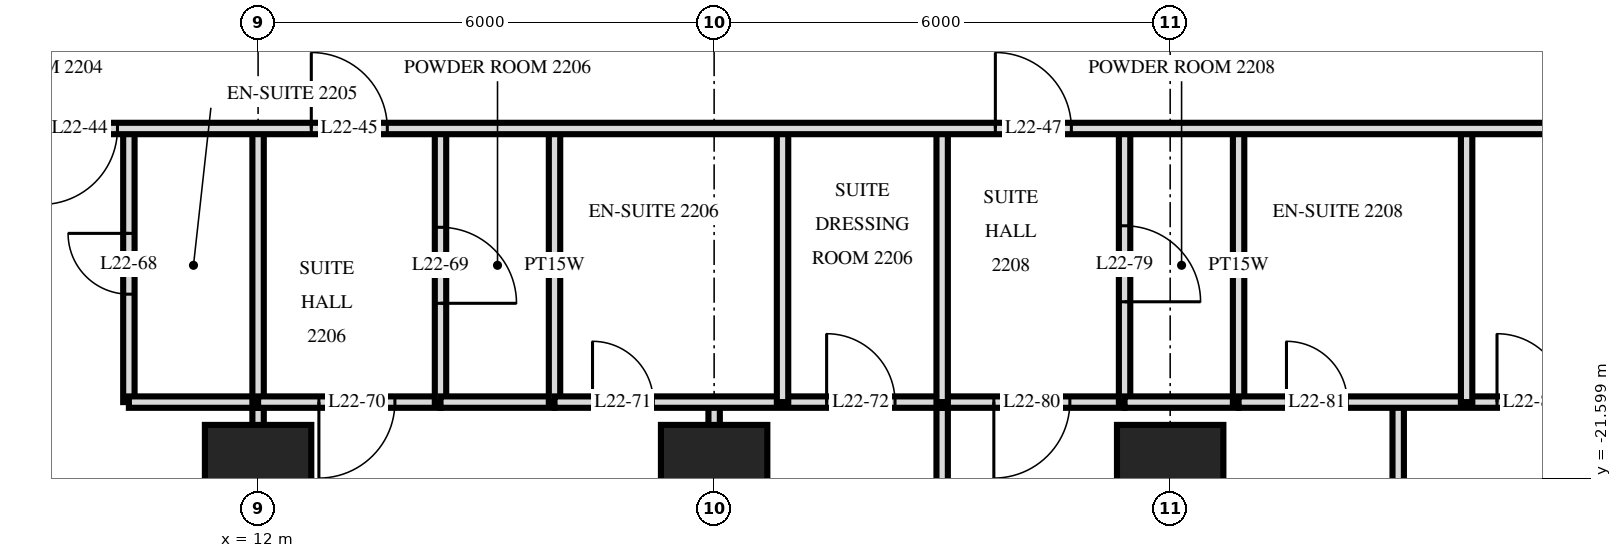
"""IFC4 building model, lengths in metres.
Left out: names, types, materials, properties, quantities, classifications, styles, units other than length and angle.
Written with IfcOpenShell. Run it as: python <this file> out.ifc"""

import sys

from ifc_helpers import new_model, si_unit, direction, frame, frame_2d, origin, origin_2d, place, context, subcontext, project, spatial, rectangle, extrude, element, fill, save


model = new_model("IFC4")
c1 = context("Model", 3, precision=1e-05, world=origin(), true_north=direction((0.0, 1.0)))
c2 = subcontext(c1, "Body", "Model", "MODEL_VIEW")
j1 = project(units=[si_unit("LENGTHUNIT", "METRE"), si_unit("PLANEANGLEUNIT", "RADIAN")], contexts=[c1])
p1 = place(None, origin())
s1 = spatial("IfcSite", under=j1, at=p1, CompositionType="ELEMENT")
p2 = place(p1, origin())
s2 = spatial("IfcBuilding", under=s1, at=p2, CompositionType="ELEMENT")
p3 = place(p2, frame((0.0, 0.0, 88.8)))
s3 = spatial("IfcBuildingStorey", under=s2, at=p3, CompositionType="ELEMENT", Elevation=88.8)
for number, where, z_axis, x_axis in (
    (1, (12.0, -21.6, 0.0), (0.0, 0.0, 1.0), (1.0, 0.0, 0.0)),
    (2, (18.0, -21.6, 0.0), (0.0, 0.0, 1.0), (1.0, 0.0, 0.0)),
    (3, (24.0, -21.6, 0.0), (0.0, 0.0, 1.0), (1.0, 0.0, 0.0)),
):
    element("IfcColumn", number, at=place(p3, frame(where, z_axis=z_axis, x_axis=x_axis)), inside=s3, PredefinedType="COLUMN", context=c2, shape_type="SweptSolid", body=[
        extrude(rectangle(XDim=1.4, YDim=1.4, at=origin_2d()), origin(), (0.0, 0.0, 1.0), 3.6),
    ])
p4 = place(p3, frame((27.9, -20.6, 0.0), z_axis=(0.0, 0.0, 1.0), x_axis=(0.0, 1.0, 0.0)))
e4 = element("IfcWall", 4, at=p4, inside=s3, PredefinedType="PARTITIONING", context=c2, shape_type="SweptSolid", body=[
    extrude(rectangle(XDim=3.6, YDim=0.15, at=frame_2d((1.8, 0.0))), origin(), (0.0, 0.0, 1.0), 3.32),
])
p5 = place(p3, frame((27.0, -29.22, 0.0), z_axis=(0.0, 0.0, 1.0), x_axis=(0.0, 1.0, 0.0)))
e5 = element("IfcWall", 5, at=p5, inside=s3, PredefinedType="PARTITIONING", context=c2, shape_type="SweptSolid", body=[
    extrude(rectangle(XDim=8.62, YDim=0.15, at=frame_2d((4.31, 0.0))), origin(), (0.0, 0.0, 1.0), 3.32),
])
p6 = place(p5, frame((3.77, 0.0, 0.0)))
e6 = element("IfcOpeningElement", 6, at=p6, cuts=e5, PredefinedType="OPENING", context=c2, shape_type="SweptSolid", body=[
    extrude(rectangle(XDim=0.9, YDim=2.1, at=frame_2d((0.45, 1.05))), frame((0.0, 0.085, 0.0), z_axis=(0.0, -1.0, 0.0), x_axis=(1.0, 0.0, 0.0)), (0.0, 0.0, 1.0), 0.17),
])
p7 = place(p3, frame((24.9, -20.6, 0.0), z_axis=(0.0, 0.0, 1.0), x_axis=(0.0, 1.0, 0.0)))
e7 = element("IfcWall", 7, at=p7, inside=s3, PredefinedType="PLUMBINGWALL", context=c2, shape_type="SweptSolid", body=[
    extrude(rectangle(XDim=3.6, YDim=0.15, at=frame_2d((1.8, 0.0))), origin(), (0.0, 0.0, 1.0), 3.32),
])
p8 = place(p3, frame((23.4, -20.6, 0.0), z_axis=(0.0, 0.0, 1.0), x_axis=(0.0, 1.0, 0.0)))
e8 = element("IfcWall", 8, at=p8, inside=s3, PredefinedType="PARTITIONING", context=c2, shape_type="SweptSolid", body=[
    extrude(rectangle(XDim=3.6, YDim=0.15, at=frame_2d((1.8, 0.0))), origin(), (0.0, 0.0, 1.0), 3.32),
])
p9 = place(p8, frame((1.32, 0.0, 0.0)))
e9 = element("IfcOpeningElement", 9, at=p9, cuts=e8, PredefinedType="OPENING", context=c2, shape_type="SweptSolid", body=[
    extrude(rectangle(XDim=1.0, YDim=2.1, at=frame_2d((0.5, 1.05))), frame((0.0, 0.085, 0.0), z_axis=(0.0, -1.0, 0.0), x_axis=(1.0, 0.0, 0.0)), (0.0, 0.0, 1.0), 0.17),
])
p10 = place(p3, frame((21.0, -20.6, 0.0), z_axis=(0.0, 0.0, 1.0), x_axis=(0.0, 1.0, 0.0)))
e10 = element("IfcWall", 10, at=p10, inside=s3, PredefinedType="PARTITIONING", context=c2, shape_type="SweptSolid", body=[
    extrude(rectangle(XDim=3.6, YDim=0.15, at=frame_2d((1.8, 0.0))), origin(), (0.0, 0.0, 1.0), 3.32),
])
p11 = place(p3, frame((21.0, -29.22, 0.0), z_axis=(0.0, 0.0, 1.0), x_axis=(0.0, 1.0, 0.0)))
e11 = element("IfcWall", 11, at=p11, inside=s3, PredefinedType="PARTITIONING", context=c2, shape_type="SweptSolid", body=[
    extrude(rectangle(XDim=8.62, YDim=0.15, at=frame_2d((4.31, 0.0))), origin(), (0.0, 0.0, 1.0), 3.32),
])
p12 = place(p3, frame((18.9, -20.6, 0.0), z_axis=(0.0, 0.0, 1.0), x_axis=(0.0, 1.0, 0.0)))
e12 = element("IfcWall", 12, at=p12, inside=s3, PredefinedType="PARTITIONING", context=c2, shape_type="SweptSolid", body=[
    extrude(rectangle(XDim=3.6, YDim=0.15, at=frame_2d((1.8, 0.0))), origin(), (0.0, 0.0, 1.0), 3.32),
])
p13 = place(p3, frame((18.0, -29.22, 0.0), z_axis=(0.0, 0.0, 1.0), x_axis=(0.0, 1.0, 0.0)))
e13 = element("IfcWall", 13, at=p13, inside=s3, PredefinedType="PARTITIONING", context=c2, shape_type="SweptSolid", body=[
    extrude(rectangle(XDim=8.62, YDim=0.15, at=frame_2d((4.31, 0.0))), origin(), (0.0, 0.0, 1.0), 3.32),
])
p14 = place(p13, frame((3.75, 0.0, 0.0)))
e14 = element("IfcOpeningElement", 14, at=p14, cuts=e13, PredefinedType="OPENING", context=c2, shape_type="SweptSolid", body=[
    extrude(rectangle(XDim=0.9, YDim=2.1, at=frame_2d((0.45, 1.05))), frame((0.0, 0.085, 0.0), z_axis=(0.0, -1.0, 0.0), x_axis=(1.0, 0.0, 0.0)), (0.0, 0.0, 1.0), 0.17),
])
p15 = place(p3, frame((15.9, -20.6, 0.0), z_axis=(0.0, 0.0, 1.0), x_axis=(0.0, 1.0, 0.0)))
e15 = element("IfcWall", 15, at=p15, inside=s3, PredefinedType="PLUMBINGWALL", context=c2, shape_type="SweptSolid", body=[
    extrude(rectangle(XDim=3.6, YDim=0.15, at=frame_2d((1.8, 0.0))), origin(), (0.0, 0.0, 1.0), 3.32),
])
p16 = place(p3, frame((14.4, -20.6, 0.0), z_axis=(0.0, 0.0, 1.0), x_axis=(0.0, 1.0, 0.0)))
e16 = element("IfcWall", 16, at=p16, inside=s3, PredefinedType="PARTITIONING", context=c2, shape_type="SweptSolid", body=[
    extrude(rectangle(XDim=3.6, YDim=0.15, at=frame_2d((1.8, 0.0))), origin(), (0.0, 0.0, 1.0), 3.32),
])
p17 = place(p16, frame((1.3, 0.0, 0.0)))
e17 = element("IfcOpeningElement", 17, at=p17, cuts=e16, PredefinedType="OPENING", context=c2, shape_type="SweptSolid", body=[
    extrude(rectangle(XDim=1.0, YDim=2.1, at=frame_2d((0.5, 1.05))), frame((0.0, 0.085, 0.0), z_axis=(0.0, -1.0, 0.0), x_axis=(1.0, 0.0, 0.0)), (0.0, 0.0, 1.0), 0.17),
])
p18 = place(p3, frame((12.0, -20.6, 0.0), z_axis=(0.0, 0.0, 1.0), x_axis=(0.0, 1.0, 0.0)))
e18 = element("IfcWall", 18, at=p18, inside=s3, PredefinedType="PARTITIONING", context=c2, shape_type="SweptSolid", body=[
    extrude(rectangle(XDim=3.6, YDim=0.15, at=frame_2d((1.8, 0.0))), origin(), (0.0, 0.0, 1.0), 3.32),
])
p19 = place(p3, frame((12.0, -29.22, 0.0), z_axis=(0.0, 0.0, 1.0), x_axis=(0.0, 1.0, 0.0)))
e19 = element("IfcWall", 19, at=p19, inside=s3, PredefinedType="PARTITIONING", context=c2, shape_type="SweptSolid", body=[
    extrude(rectangle(XDim=8.62, YDim=0.15, at=frame_2d((4.31, 0.0))), origin(), (0.0, 0.0, 1.0), 3.32),
])
p20 = place(p3, frame((10.3, -20.6, 0.0), z_axis=(0.0, 0.0, 1.0), x_axis=(0.0, 1.0, 0.0)))
e20 = element("IfcWall", 20, at=p20, inside=s3, PredefinedType="PARTITIONING", context=c2, shape_type="SweptSolid", body=[
    extrude(rectangle(XDim=3.6, YDim=0.15, at=frame_2d((1.8, 0.0))), origin(), (0.0, 0.0, 1.0), 3.32),
])
p21 = place(p20, frame((1.42, 0.0, 0.0)))
e21 = element("IfcOpeningElement", 21, at=p21, cuts=e20, PredefinedType="OPENING", context=c2, shape_type="SweptSolid", body=[
    extrude(rectangle(XDim=0.8, YDim=2.1, at=frame_2d((0.4, 1.05))), frame((0.0, 0.085, 0.0), z_axis=(0.0, -1.0, 0.0), x_axis=(1.0, 0.0, 0.0)), (0.0, 0.0, 1.0), 0.17),
])
p22 = place(p3, frame((12.0, -20.6, 0.0), z_axis=(0.0, 0.0, 1.0), x_axis=(1.0, 0.0, 0.0)))
e22 = element("IfcWall", 22, at=p22, inside=s3, PredefinedType="PARTITIONING", context=c2, shape_type="SweptSolid", body=[
    extrude(rectangle(XDim=2.4, YDim=0.15, at=frame_2d((1.2, 0.0))), origin(), (0.0, 0.0, 1.0), 3.32),
])
p23 = place(p22, frame((0.8, 0.0, 0.0)))
e23 = element("IfcOpeningElement", 23, at=p23, cuts=e22, PredefinedType="OPENING", context=c2, shape_type="SweptSolid", body=[
    extrude(rectangle(XDim=1.0, YDim=2.1, at=frame_2d((0.5, 1.05))), frame((0.0, 0.085, 0.0), z_axis=(0.0, -1.0, 0.0), x_axis=(1.0, 0.0, 0.0)), (0.0, 0.0, 1.0), 0.17),
])
p24 = place(p3, frame((21.0, -20.6, 0.0), z_axis=(0.0, 0.0, 1.0), x_axis=(1.0, 0.0, 0.0)))
e24 = element("IfcWall", 24, at=p24, inside=s3, PredefinedType="PARTITIONING", context=c2, shape_type="SweptSolid", body=[
    extrude(rectangle(XDim=2.4, YDim=0.15, at=frame_2d((1.2, 0.0))), origin(), (0.0, 0.0, 1.0), 3.32),
])
p25 = place(p24, frame((0.68, 0.0, 0.0)))
e25 = element("IfcOpeningElement", 25, at=p25, cuts=e24, PredefinedType="OPENING", context=c2, shape_type="SweptSolid", body=[
    extrude(rectangle(XDim=1.0, YDim=2.1, at=frame_2d((0.5, 1.05))), frame((0.0, 0.085, 0.0), z_axis=(0.0, -1.0, 0.0), x_axis=(1.0, 0.0, 0.0)), (0.0, 0.0, 1.0), 0.17),
])
p26 = place(p3, frame((10.3, -20.6, 0.0), z_axis=(0.0, 0.0, 1.0), x_axis=(1.0, 0.0, 0.0)))
e26 = element("IfcWall", 26, at=p26, inside=s3, PredefinedType="PARTITIONING", context=c2, shape_type="SweptSolid", body=[
    extrude(rectangle(XDim=1.7, YDim=0.15, at=frame_2d((0.85, 0.0))), origin(), (0.0, 0.0, 1.0), 3.32),
])
p27 = place(p3, frame((15.9, -20.6, 0.0), z_axis=(0.0, 0.0, 1.0), x_axis=(1.0, 0.0, 0.0)))
e27 = element("IfcWall", 27, at=p27, inside=s3, PredefinedType="PARTITIONING", context=c2, shape_type="SweptSolid", body=[
    extrude(rectangle(XDim=5.1, YDim=0.15, at=frame_2d((2.55, 0.0))), origin(), (0.0, 0.0, 1.0), 3.32),
])
p28 = place(p27, frame((0.5, 0.0, 0.0)))
e28 = element("IfcOpeningElement", 28, at=p28, cuts=e27, PredefinedType="OPENING", context=c2, shape_type="SweptSolid", body=[
    extrude(rectangle(XDim=0.8, YDim=2.1, at=frame_2d((0.4, 1.05))), frame((0.0, 0.085, 0.0), z_axis=(0.0, -1.0, 0.0), x_axis=(1.0, 0.0, 0.0)), (0.0, 0.0, 1.0), 0.17),
])
p29 = place(p27, frame((3.58, 0.0, 0.0)))
e29 = element("IfcOpeningElement", 29, at=p29, cuts=e27, PredefinedType="OPENING", context=c2, shape_type="SweptSolid", body=[
    extrude(rectangle(XDim=0.9, YDim=2.1, at=frame_2d((0.45, 1.05))), frame((0.0, 0.085, 0.0), z_axis=(0.0, -1.0, 0.0), x_axis=(1.0, 0.0, 0.0)), (0.0, 0.0, 1.0), 0.17),
])
p30 = place(p3, frame((24.9, -20.6, 0.0), z_axis=(0.0, 0.0, 1.0), x_axis=(1.0, 0.0, 0.0)))
e30 = element("IfcWall", 30, at=p30, inside=s3, PredefinedType="PARTITIONING", context=c2, shape_type="SweptSolid", body=[
    extrude(rectangle(XDim=8.22, YDim=0.15, at=frame_2d((4.11, 0.0))), origin(), (0.0, 0.0, 1.0), 3.32),
])
p31 = place(p30, frame((0.63, 0.0, 0.0)))
e31 = element("IfcOpeningElement", 31, at=p31, cuts=e30, PredefinedType="OPENING", context=c2, shape_type="SweptSolid", body=[
    extrude(rectangle(XDim=0.8, YDim=2.1, at=frame_2d((0.4, 1.05))), frame((0.0, 0.085, 0.0), z_axis=(0.0, -1.0, 0.0), x_axis=(1.0, 0.0, 0.0)), (0.0, 0.0, 1.0), 0.17),
])
p32 = place(p30, frame((3.4, 0.0, 0.0)))
e32 = element("IfcOpeningElement", 32, at=p32, cuts=e30, PredefinedType="OPENING", context=c2, shape_type="SweptSolid", body=[
    extrude(rectangle(XDim=0.9, YDim=2.1, at=frame_2d((0.45, 1.05))), frame((0.0, 0.085, 0.0), z_axis=(0.0, -1.0, 0.0), x_axis=(1.0, 0.0, 0.0)), (0.0, 0.0, 1.0), 0.17),
])
for number, where, z_axis, x_axis in (
    (33, (14.4, -20.6, 0.0), (0.0, 0.0, 1.0), (1.0, 0.0, 0.0)),
    (34, (23.4, -20.6, 0.0), (0.0, 0.0, 1.0), (1.0, 0.0, 0.0)),
):
    element("IfcWall", number, at=place(p3, frame(where, z_axis=z_axis, x_axis=x_axis)), inside=s3, PredefinedType="PLUMBINGWALL", context=c2, shape_type="SweptSolid", body=[
        extrude(rectangle(XDim=1.5, YDim=0.15, at=frame_2d((0.75, 0.0))), origin(), (0.0, 0.0, 1.0), 3.32),
    ])
p33 = place(p3, frame((-33.12, -17.0, 0.0), z_axis=(0.0, 0.0, 1.0), x_axis=(1.0, 0.0, 0.0)))
e35 = element("IfcWall", 35, at=p33, inside=s3, PredefinedType="PARTITIONING", context=c2, shape_type="SweptSolid", body=[
    extrude(rectangle(XDim=66.24, YDim=0.15, at=frame_2d((33.12, 0.0))), origin(), (0.0, 0.0, 1.0), 3.32),
])
p34 = place(p33, frame((16.27, 0.0, 0.0)))
e36 = element("IfcOpeningElement", 36, at=p34, cuts=e35, PredefinedType="OPENING", context=c2, shape_type="SweptSolid", body=[
    extrude(rectangle(XDim=1.0, YDim=2.1, at=frame_2d((0.5, 1.05))), frame((0.0, 0.085, 0.0), z_axis=(0.0, -1.0, 0.0), x_axis=(1.0, 0.0, 0.0)), (0.0, 0.0, 1.0), 0.17),
])
p35 = place(p33, frame((22.97, 0.0, 0.0)))
e37 = element("IfcOpeningElement", 37, at=p35, cuts=e35, PredefinedType="OPENING", context=c2, shape_type="SweptSolid", body=[
    extrude(rectangle(XDim=1.0, YDim=2.1, at=frame_2d((0.5, 1.05))), frame((0.0, 0.085, 0.0), z_axis=(0.0, -1.0, 0.0), x_axis=(1.0, 0.0, 0.0)), (0.0, 0.0, 1.0), 0.17),
])
p36 = place(p33, frame((34.42, 0.0, 0.0)))
e38 = element("IfcOpeningElement", 38, at=p36, cuts=e35, PredefinedType="OPENING", context=c2, shape_type="SweptSolid", body=[
    extrude(rectangle(XDim=1.0, YDim=2.1, at=frame_2d((0.5, 1.05))), frame((0.0, 0.085, 0.0), z_axis=(0.0, -1.0, 0.0), x_axis=(1.0, 0.0, 0.0)), (0.0, 0.0, 1.0), 0.17),
])
p37 = place(p33, frame((39.22, 0.0, 0.0)))
e39 = element("IfcOpeningElement", 39, at=p37, cuts=e35, PredefinedType="OPENING", context=c2, shape_type="SweptSolid", body=[
    extrude(rectangle(XDim=1.0, YDim=2.1, at=frame_2d((0.5, 1.05))), frame((0.0, 0.085, 0.0), z_axis=(0.0, -1.0, 0.0), x_axis=(1.0, 0.0, 0.0)), (0.0, 0.0, 1.0), 0.17),
])
p38 = place(p33, frame((42.27, 0.0, 0.0)))
e40 = element("IfcOpeningElement", 40, at=p38, cuts=e35, PredefinedType="OPENING", context=c2, shape_type="SweptSolid", body=[
    extrude(rectangle(XDim=1.0, YDim=2.1, at=frame_2d((0.5, 1.05))), frame((0.0, 0.085, 0.0), z_axis=(0.0, -1.0, 0.0), x_axis=(1.0, 0.0, 0.0)), (0.0, 0.0, 1.0), 0.17),
])
p39 = place(p33, frame((45.82, 0.0, 0.0)))
e41 = element("IfcOpeningElement", 41, at=p39, cuts=e35, PredefinedType="OPENING", context=c2, shape_type="SweptSolid", body=[
    extrude(rectangle(XDim=1.0, YDim=2.1, at=frame_2d((0.5, 1.05))), frame((0.0, 0.085, 0.0), z_axis=(0.0, -1.0, 0.0), x_axis=(1.0, 0.0, 0.0)), (0.0, 0.0, 1.0), 0.17),
])
p40 = place(p33, frame((13.42, 0.0, 0.0)))
e42 = element("IfcOpeningElement", 42, at=p40, cuts=e35, PredefinedType="OPENING", context=c2, shape_type="SweptSolid", body=[
    extrude(rectangle(XDim=1.0, YDim=2.1, at=frame_2d((0.5, 1.05))), frame((0.0, 0.085, 0.0), z_axis=(0.0, -1.0, 0.0), x_axis=(1.0, 0.0, 0.0)), (0.0, 0.0, 1.0), 0.17),
])
p41 = place(p33, frame((54.82, 0.0, 0.0)))
e43 = element("IfcOpeningElement", 43, at=p41, cuts=e35, PredefinedType="OPENING", context=c2, shape_type="SweptSolid", body=[
    extrude(rectangle(XDim=1.0, YDim=2.1, at=frame_2d((0.5, 1.05))), frame((0.0, 0.085, 0.0), z_axis=(0.0, -1.0, 0.0), x_axis=(1.0, 0.0, 0.0)), (0.0, 0.0, 1.0), 0.17),
])
p42 = place(p38, frame((0.5, 0.0, 0.0), z_axis=(0.0, 0.0, 1.0), x_axis=(-1.0, 0.0, 0.0)))
e44 = element("IfcDoor", 44, at=p42, inside=s3, OperationType="SINGLE_SWING_LEFT", PredefinedType="DOOR", context=c2, shape_type="SweptSolid", body=[
    extrude(rectangle(XDim=1.0, YDim=2.1, at=frame_2d((0.0, 1.05))), frame((0.0, -0.025, 0.0), z_axis=(0.0, 1.0, 0.0), x_axis=(-1.0, 0.0, 0.0)), (0.0, 0.0, 1.0), 0.05),
])
fill(e40, e44)
p43 = place(p39, origin())
e45 = element("IfcDoor", 45, at=p43, inside=s3, OperationType="SINGLE_SWING_RIGHT", PredefinedType="DOOR", context=c2, shape_type="SweptSolid", body=[
    extrude(rectangle(XDim=1.0, YDim=2.1, at=frame_2d((0.5, 1.05))), frame((0.0, 0.025, 0.0), z_axis=(0.0, -1.0, 0.0), x_axis=(1.0, 0.0, 0.0)), (0.0, 0.0, 1.0), 0.05),
])
fill(e41, e45)
p44 = place(p41, origin())
e46 = element("IfcDoor", 46, at=p44, inside=s3, OperationType="SINGLE_SWING_RIGHT", PredefinedType="DOOR", context=c2, shape_type="SweptSolid", body=[
    extrude(rectangle(XDim=1.0, YDim=2.1, at=frame_2d((0.5, 1.05))), frame((0.0, 0.025, 0.0), z_axis=(0.0, -1.0, 0.0), x_axis=(1.0, 0.0, 0.0)), (0.0, 0.0, 1.0), 0.05),
])
fill(e43, e46)
p45 = place(p21, origin())
e47 = element("IfcDoor", 47, at=p45, inside=s3, OperationType="SINGLE_SWING_LEFT", PredefinedType="DOOR", context=c2, shape_type="SweptSolid", body=[
    extrude(rectangle(XDim=0.8, YDim=2.1, at=frame_2d((0.4, 1.05))), frame((0.0, 0.025, 0.0), z_axis=(0.0, -1.0, 0.0), x_axis=(1.0, 0.0, 0.0)), (0.0, 0.0, 1.0), 0.05),
])
fill(e21, e47)
p46 = place(p17, frame((0.5, 0.0, 0.0), z_axis=(0.0, 0.0, 1.0), x_axis=(-1.0, 0.0, 0.0)))
e48 = element("IfcDoor", 48, at=p46, inside=s3, OperationType="SINGLE_SWING_LEFT", PredefinedType="DOOR", context=c2, shape_type="SweptSolid", body=[
    extrude(rectangle(XDim=1.0, YDim=2.1, at=frame_2d((0.0, 1.05))), frame((0.0, -0.025, 0.0), z_axis=(0.0, 1.0, 0.0), x_axis=(-1.0, 0.0, 0.0)), (0.0, 0.0, 1.0), 0.05),
])
fill(e17, e48)
p47 = place(p23, frame((0.5, 0.0, 0.0), z_axis=(0.0, 0.0, 1.0), x_axis=(-1.0, 0.0, 0.0)))
e49 = element("IfcDoor", 49, at=p47, inside=s3, OperationType="SINGLE_SWING_LEFT", PredefinedType="DOOR", context=c2, shape_type="SweptSolid", body=[
    extrude(rectangle(XDim=1.0, YDim=2.1, at=frame_2d((0.0, 1.05))), frame((0.0, -0.025, 0.0), z_axis=(0.0, 1.0, 0.0), x_axis=(-1.0, 0.0, 0.0)), (0.0, 0.0, 1.0), 0.05),
])
fill(e23, e49)
p48 = place(p28, origin())
e50 = element("IfcDoor", 50, at=p48, inside=s3, OperationType="SINGLE_SWING_RIGHT", PredefinedType="DOOR", context=c2, shape_type="SweptSolid", body=[
    extrude(rectangle(XDim=0.8, YDim=2.1, at=frame_2d((0.4, 1.05))), frame((0.0, 0.025, 0.0), z_axis=(0.0, -1.0, 0.0), x_axis=(1.0, 0.0, 0.0)), (0.0, 0.0, 1.0), 0.05),
])
fill(e28, e50)
p49 = place(p29, origin())
e51 = element("IfcDoor", 51, at=p49, inside=s3, OperationType="SINGLE_SWING_RIGHT", PredefinedType="DOOR", context=c2, shape_type="SweptSolid", body=[
    extrude(rectangle(XDim=0.9, YDim=2.1, at=frame_2d((0.45, 1.05))), frame((0.0, 0.025, 0.0), z_axis=(0.0, -1.0, 0.0), x_axis=(1.0, 0.0, 0.0)), (0.0, 0.0, 1.0), 0.05),
])
fill(e29, e51)
p50 = place(p9, frame((0.5, 0.0, 0.0), z_axis=(0.0, 0.0, 1.0), x_axis=(-1.0, 0.0, 0.0)))
e52 = element("IfcDoor", 52, at=p50, inside=s3, OperationType="SINGLE_SWING_LEFT", PredefinedType="DOOR", context=c2, shape_type="SweptSolid", body=[
    extrude(rectangle(XDim=1.0, YDim=2.1, at=frame_2d((0.0, 1.05))), frame((0.0, -0.025, 0.0), z_axis=(0.0, 1.0, 0.0), x_axis=(-1.0, 0.0, 0.0)), (0.0, 0.0, 1.0), 0.05),
])
fill(e9, e52)
p51 = place(p25, frame((0.5, 0.0, 0.0), z_axis=(0.0, 0.0, 1.0), x_axis=(-1.0, 0.0, 0.0)))
e53 = element("IfcDoor", 53, at=p51, inside=s3, OperationType="SINGLE_SWING_LEFT", PredefinedType="DOOR", context=c2, shape_type="SweptSolid", body=[
    extrude(rectangle(XDim=1.0, YDim=2.1, at=frame_2d((0.0, 1.05))), frame((0.0, -0.025, 0.0), z_axis=(0.0, 1.0, 0.0), x_axis=(-1.0, 0.0, 0.0)), (0.0, 0.0, 1.0), 0.05),
])
fill(e25, e53)
p52 = place(p31, origin())
e54 = element("IfcDoor", 54, at=p52, inside=s3, OperationType="SINGLE_SWING_RIGHT", PredefinedType="DOOR", context=c2, shape_type="SweptSolid", body=[
    extrude(rectangle(XDim=0.8, YDim=2.1, at=frame_2d((0.4, 1.05))), frame((0.0, 0.025, 0.0), z_axis=(0.0, -1.0, 0.0), x_axis=(1.0, 0.0, 0.0)), (0.0, 0.0, 1.0), 0.05),
])
fill(e31, e54)
p53 = place(p32, origin())
e55 = element("IfcDoor", 55, at=p53, inside=s3, OperationType="SINGLE_SWING_RIGHT", PredefinedType="DOOR", context=c2, shape_type="SweptSolid", body=[
    extrude(rectangle(XDim=0.9, YDim=2.1, at=frame_2d((0.45, 1.05))), frame((0.0, 0.025, 0.0), z_axis=(0.0, -1.0, 0.0), x_axis=(1.0, 0.0, 0.0)), (0.0, 0.0, 1.0), 0.05),
])
fill(e32, e55)
save(model, sys.argv[1])
